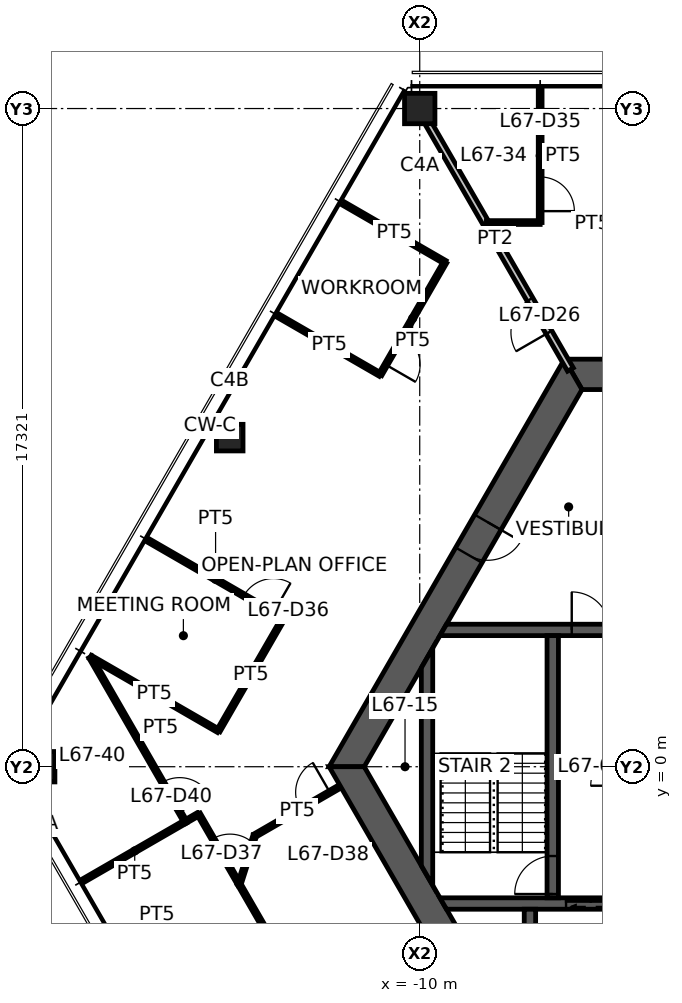
"""IFC4 building model, lengths in metres.
Left out: names, types, materials, properties, quantities, classifications, styles, units other than length and angle.
Written with IfcOpenShell. Run it as: python <this file> out.ifc"""

import sys

from ifc_helpers import new_model, si_unit, direction, frame, frame_2d, origin, origin_2d, place, context, subcontext, project, spatial, polyline, rectangle, hollow_rectangle, outline, extrude, element, fill, save


model = new_model("IFC4")
c1 = context("Model", 3, precision=1e-05, world=origin(), true_north=direction((0.0, 1.0)))
c2 = subcontext(c1, "Body", "Model", "MODEL_VIEW")
j1 = project(units=[si_unit("LENGTHUNIT", "METRE"), si_unit("PLANEANGLEUNIT", "RADIAN")], contexts=[c1])
p1 = place(None, origin())
s1 = spatial("IfcSite", under=j1, at=p1, CompositionType="ELEMENT")
p2 = place(p1, origin())
s2 = spatial("IfcBuilding", under=s1, at=p2, CompositionType="ELEMENT")
p3 = place(p2, frame((0.0, 0.0, 267.4)))
s3 = spatial("IfcBuildingStorey", under=s2, at=p3, CompositionType="ELEMENT", Elevation=267.4)
for number, where, z_axis, x_axis in (
    (1, (-10.0, 17.321, 0.0), (0.0, 0.0, 1.0), (1.0, 0.0, 0.0)),
    (2, (-20.0, 0.0, 0.0), (0.0, 0.0, 1.0), (1.0, 0.0, 0.0)),
):
    element("IfcColumn", number, at=place(p3, frame(where, z_axis=z_axis, x_axis=x_axis)), inside=s3, PredefinedType="COLUMN", context=c2, shape_type="SweptSolid", body=[
        extrude(hollow_rectangle(XDim=0.8, YDim=0.8, WallThickness=0.04, at=origin_2d()), origin(), (0.0, 0.0, 1.0), 3.9),
    ])
p4 = place(p3, frame((-15.0, 8.66, 0.0), z_axis=(0.0, 0.0, 1.0), x_axis=(1.0, 0.0, 0.0)))
e3 = element("IfcColumn", 3, at=p4, inside=s3, PredefinedType="COLUMN", context=c2, shape_type="SweptSolid", body=[
    extrude(hollow_rectangle(XDim=0.7, YDim=0.7, WallThickness=0.032, at=origin_2d()), origin(), (0.0, 0.0, 1.0), 3.9),
])
p5 = place(p3, frame((5.961, 10.325, 0.0), z_axis=(0.0, 0.0, 1.0), x_axis=(-1.0, 0.0, 0.0)))
e4 = element("IfcWall", 4, at=p5, inside=s3, PredefinedType="SHEAR", context=c2, shape_type="SweptSolid", body=[
    extrude(outline(polyline([(-0.231, -0.4), (4.636, -0.4), (5.536, -0.4), (6.386, -0.4), (7.286, -0.4), (12.153, -0.4), (11.691, 0.4), (7.286, 0.4), (6.386, 0.4), (5.536, 0.4), (4.636, 0.4), (0.231, 0.4), (-0.231, -0.4)])), origin(), (0.0, 0.0, 1.0), 3.9),
])
p6 = place(p5, frame((6.386, 0.0, 0.0)))
e5 = element("IfcOpeningElement", 5, at=p6, cuts=e4, PredefinedType="OPENING", context=c2, shape_type="SweptSolid", body=[
    extrude(rectangle(XDim=0.9, YDim=2.1, at=frame_2d((0.45, 1.05))), frame((0.0, 0.41, 0.0), z_axis=(0.0, -1.0, 0.0), x_axis=(1.0, 0.0, 0.0)), (0.0, 0.0, 1.0), 0.82),
])
p7 = place(p5, frame((4.636, 0.0, 0.0)))
e6 = element("IfcOpeningElement", 6, at=p7, cuts=e4, PredefinedType="OPENING", context=c2, shape_type="SweptSolid", body=[
    extrude(rectangle(XDim=0.9, YDim=2.1, at=frame_2d((0.45, 1.05))), frame((0.0, 0.41, 0.0), z_axis=(0.0, -1.0, 0.0), x_axis=(1.0, 0.0, 0.0)), (0.0, 0.0, 1.0), 0.82),
])
p8 = place(p3, frame((-5.961, 10.325, 0.0), z_axis=(0.0, 0.0, 1.0), x_axis=(-0.500004296715, -0.866022923061, 0.0)))
e7 = element("IfcWall", 7, at=p8, inside=s3, PredefinedType="SHEAR", context=c2, shape_type="SweptSolid", body=[
    extrude(outline(polyline([(-0.231, -0.4), (4.494, -0.4), (5.494, -0.4), (12.153, -0.4), (11.691, 0.4), (5.494, 0.4), (4.494, 0.4), (0.231, 0.4), (-0.231, -0.4)])), origin(), (0.0, 0.0, 1.0), 3.9),
])
p9 = place(p8, frame((4.494, 0.0, 0.0)))
e8 = element("IfcOpeningElement", 8, at=p9, cuts=e7, PredefinedType="OPENING", context=c2, shape_type="SweptSolid", body=[
    extrude(rectangle(XDim=1.0, YDim=2.1, at=frame_2d((0.5, 1.05))), frame((0.0, 0.41, 0.0), z_axis=(0.0, -1.0, 0.0), x_axis=(1.0, 0.0, 0.0)), (0.0, 0.0, 1.0), 0.82),
])
p10 = place(p3, frame((-11.922, 0.0, 0.0), z_axis=(0.0, 0.0, 1.0), x_axis=(0.500004296715, -0.866022923061, 0.0)))
e9 = element("IfcWall", 9, at=p10, inside=s3, PredefinedType="SHEAR", context=c2, shape_type="SweptSolid", body=[
    extrude(outline(polyline([(-0.231, -0.4), (6.281, -0.4), (7.081, -0.4), (12.153, -0.4), (11.691, 0.4), (7.081, 0.4), (6.281, 0.4), (0.231, 0.4), (-0.231, -0.4)])), origin(), (0.0, 0.0, 1.0), 3.9),
])
p11 = place(p10, frame((6.281, 0.0, 0.0)))
e10 = element("IfcOpeningElement", 10, at=p11, cuts=e9, PredefinedType="OPENING", context=c2, shape_type="SweptSolid", body=[
    extrude(rectangle(XDim=0.8, YDim=2.1, at=frame_2d((0.4, 1.05))), frame((0.0, 0.41, 0.0), z_axis=(0.0, -1.0, 0.0), x_axis=(1.0, 0.0, 0.0)), (0.0, 0.0, 1.0), 0.82),
])
p12 = place(p3, frame((-9.382, 3.6, 0.0), z_axis=(0.0, 0.0, 1.0), x_axis=(1.0, 0.0, 0.0)))
e11 = element("IfcWall", 11, at=p12, inside=s3, PredefinedType="SHEAR", context=c2, shape_type="SweptSolid", body=[
    extrude(outline(polyline([(-0.087, -0.15), (3.382, -0.15), (4.382, -0.15), (5.782, -0.15), (6.882, -0.15), (7.932, -0.15), (7.932, 0.15), (6.882, 0.15), (5.782, 0.15), (4.382, 0.15), (3.382, 0.15), (0.087, 0.15), (-0.087, -0.15)])), origin(), (0.0, 0.0, 1.0), 3.9),
])
p13 = place(p12, frame((3.382, 0.0, 0.0)))
e12 = element("IfcOpeningElement", 12, at=p13, cuts=e11, PredefinedType="OPENING", context=c2, shape_type="SweptSolid", body=[
    extrude(rectangle(XDim=1.0, YDim=2.1, at=frame_2d((0.5, 1.05))), frame((0.0, 0.16, 0.0), z_axis=(0.0, -1.0, 0.0), x_axis=(1.0, 0.0, 0.0)), (0.0, 0.0, 1.0), 0.32),
])
p14 = place(p12, frame((5.782, 0.0, 0.0)))
e13 = element("IfcOpeningElement", 13, at=p14, cuts=e11, PredefinedType="OPENING", context=c2, shape_type="SweptSolid", body=[
    extrude(rectangle(XDim=1.1, YDim=2.1, at=frame_2d((0.55, 1.05))), frame((0.0, 0.16, 0.0), z_axis=(0.0, -1.0, 0.0), x_axis=(1.0, 0.0, 0.0)), (0.0, 0.0, 1.0), 0.32),
])
p15 = place(p3, frame((-9.382, -3.6, 0.0), z_axis=(0.0, 0.0, 1.0), x_axis=(1.0, 0.0, 0.0)))
e14 = element("IfcWall", 14, at=p15, inside=s3, PredefinedType="SHEAR", context=c2, shape_type="SweptSolid", body=[
    extrude(outline(polyline([(0.087, -0.15), (3.232, -0.15), (4.532, -0.15), (5.782, -0.15), (6.882, -0.15), (7.932, -0.15), (7.932, 0.15), (6.882, 0.15), (5.782, 0.15), (4.532, 0.15), (3.232, 0.15), (-0.087, 0.15), (0.087, -0.15)])), origin(), (0.0, 0.0, 1.0), 3.9),
])
p16 = place(p15, frame((5.782, 0.0, 0.0)))
e15 = element("IfcOpeningElement", 15, at=p16, cuts=e14, PredefinedType="OPENING", context=c2, shape_type="SweptSolid", body=[
    extrude(rectangle(XDim=1.1, YDim=2.1, at=frame_2d((0.55, 1.05))), frame((0.0, 0.16, 0.0), z_axis=(0.0, -1.0, 0.0), x_axis=(1.0, 0.0, 0.0)), (0.0, 0.0, 1.0), 0.32),
])
p17 = place(p15, frame((3.232, 0.0, 0.0)))
e16 = element("IfcOpeningElement", 16, at=p17, cuts=e14, PredefinedType="OPENING", context=c2, shape_type="SweptSolid", body=[
    extrude(rectangle(XDim=1.3, YDim=2.1, at=frame_2d((0.65, 1.05))), frame((0.0, 0.16, 0.0), z_axis=(0.0, -1.0, 0.0), x_axis=(1.0, 0.0, 0.0)), (0.0, 0.0, 1.0), 0.32),
])
p18 = place(p3, frame((-6.5, -3.45, 0.0), z_axis=(0.0, 0.0, 1.0), x_axis=(0.0, 1.0, 0.0)))
e17 = element("IfcWall", 17, at=p18, inside=s3, PredefinedType="SHEAR", context=c2, shape_type="SweptSolid", body=[
    extrude(rectangle(XDim=6.9, YDim=0.3, at=frame_2d((3.45, 0.0))), origin(), (0.0, 0.0, 1.0), 3.9),
])
p19 = place(p18, frame((0.1, 0.0, 0.0)))
e18 = element("IfcOpeningElement", 18, at=p19, cuts=e17, PredefinedType="OPENING", context=c2, shape_type="SweptSolid", body=[
    extrude(rectangle(XDim=1.0, YDim=2.1, at=frame_2d((0.5, 1.05))), frame((0.0, 0.16, 0.0), z_axis=(0.0, -1.0, 0.0), x_axis=(1.0, 0.0, 0.0)), (0.0, 0.0, 1.0), 0.32),
])
p20 = place(p3, frame((-7.1, -3.75, 0.0), z_axis=(0.0, 0.0, 1.0), x_axis=(0.0, -1.0, 0.0)))
e19 = element("IfcWall", 19, at=p20, inside=s3, PredefinedType="SHEAR", context=c2, shape_type="SweptSolid", body=[
    extrude(rectangle(XDim=3.1, YDim=0.3, at=frame_2d((1.55, 0.0))), origin(), (0.0, 0.0, 1.0), 3.9),
])
p21 = place(p3, frame((-9.808, -2.862, 0.0), z_axis=(0.0, 0.0, 1.0), x_axis=(0.0, 1.0, 0.0)))
e20 = element("IfcWall", 20, at=p21, inside=s3, PredefinedType="SHEAR", context=c2, shape_type="SweptSolid", body=[
    extrude(outline(polyline([(-0.26, -0.15), (5.984, -0.15), (5.465, 0.15), (0.26, 0.15), (-0.26, -0.15)])), origin(), (0.0, 0.0, 1.0), 3.9),
])
p22 = place(p3, frame((-6.035, 10.453, 0.0), z_axis=(0.0, 0.0, 1.0), x_axis=(-0.499989830942, 0.866031274813, 0.0)))
e21 = element("IfcWall", 21, at=p22, inside=s3, PredefinedType="PARTITIONING", context=c2, shape_type="SweptSolid", body=[
    extrude(rectangle(XDim=7.93, YDim=0.175, at=frame_2d((3.965, 0.0))), origin(), (0.0, 0.0, 1.0), 3.05),
])
p23 = place(p22, frame((1.13, 0.0, 0.0)))
e22 = element("IfcOpeningElement", 22, at=p23, cuts=e21, PredefinedType="OPENING", context=c2, shape_type="SweptSolid", body=[
    extrude(rectangle(XDim=1.0, YDim=2.1, at=frame_2d((0.5, 1.05))), frame((0.0, 0.098, 0.0), z_axis=(0.0, -1.0, 0.0), x_axis=(1.0, 0.0, 0.0)), (0.0, 0.0, 1.0), 0.195),
])
p24 = place(p3, frame((-6.831, 14.321, 0.0), z_axis=(0.0, 0.0, 1.0), x_axis=(-1.0, 0.0, 0.0)))
e23 = element("IfcWall", 23, at=p24, inside=s3, PredefinedType="PARTITIONING", context=c2, shape_type="SweptSolid", body=[
    extrude(rectangle(XDim=1.414, YDim=0.1, at=frame_2d((0.707, 0.0))), origin(), (0.0, 0.0, 1.0), 2.95),
])
p25 = place(p3, frame((-6.831, 17.835, 0.0), z_axis=(0.0, 0.0, 1.0), x_axis=(0.0, -1.0, 0.0)))
e24 = element("IfcWall", 24, at=p25, inside=s3, PredefinedType="PARTITIONING", context=c2, shape_type="SweptSolid", body=[
    extrude(rectangle(XDim=3.515, YDim=0.1, at=frame_2d((1.757, 0.0))), origin(), (0.0, 0.0, 1.0), 2.95),
])
p26 = place(p25, frame((2.315, 0.0, 0.0)))
e25 = element("IfcOpeningElement", 25, at=p26, cuts=e24, PredefinedType="OPENING", context=c2, shape_type="SweptSolid", body=[
    extrude(rectangle(XDim=0.9, YDim=2.1, at=frame_2d((0.45, 1.05))), frame((0.0, 0.06, 0.0), z_axis=(0.0, -1.0, 0.0), x_axis=(1.0, 0.0, 0.0)), (0.0, 0.0, 1.0), 0.12),
])
p27 = place(p3, frame((-17.154, 5.96, 0.0), z_axis=(0.0, 0.0, 1.0), x_axis=(0.866014662111, -0.500018604663, 0.0)))
e26 = element("IfcWall", 26, at=p27, inside=s3, PredefinedType="PARTITIONING", context=c2, shape_type="SweptSolid", body=[
    extrude(rectangle(XDim=4.115, YDim=0.1, at=frame_2d((2.058, 0.0))), origin(), (0.0, 0.0, 1.0), 2.95),
])
p28 = place(p27, frame((2.915, 0.0, 0.0)))
e27 = element("IfcOpeningElement", 27, at=p28, cuts=e26, PredefinedType="OPENING", context=c2, shape_type="SweptSolid", body=[
    extrude(rectangle(XDim=0.9, YDim=2.1, at=frame_2d((0.45, 1.05))), frame((0.0, 0.06, 0.0), z_axis=(0.0, -1.0, 0.0), x_axis=(1.0, 0.0, 0.0)), (0.0, 0.0, 1.0), 0.12),
])
p29 = place(p3, frame((-15.298, 0.945, 0.0), z_axis=(0.0, 0.0, 1.0), x_axis=(-0.866041390868, 0.499972308537, 0.0)))
e28 = element("IfcWall", 28, at=p29, inside=s3, PredefinedType="PARTITIONING", context=c2, shape_type="SweptSolid", body=[
    extrude(rectangle(XDim=3.891, YDim=0.1, at=frame_2d((1.945, 0.0))), origin(), (0.0, 0.0, 1.0), 2.95),
])
p30 = place(p3, frame((-13.59, 3.902, 0.0), z_axis=(0.0, 0.0, 1.0), x_axis=(-0.500021524473, -0.866012976267, 0.0)))
e29 = element("IfcWall", 29, at=p30, inside=s3, PredefinedType="PARTITIONING", context=c2, shape_type="SweptSolid", body=[
    extrude(rectangle(XDim=3.415, YDim=0.1, at=frame_2d((1.708, 0.0))), origin(), (0.0, 0.0, 1.0), 2.95),
])
p31 = place(p3, frame((-14.755, -3.085, 0.0), z_axis=(0.0, 0.0, 1.0), x_axis=(0.500006757851, -0.866021502102, 0.0)))
e30 = element("IfcWall", 30, at=p31, inside=s3, PredefinedType="PARTITIONING", context=c2, shape_type="SweptSolid", body=[
    extrude(rectangle(XDim=4.386, YDim=0.1, at=frame_2d((2.193, 0.0))), origin(), (0.0, 0.0, 1.0), 2.95),
])
p32 = place(p3, frame((-18.84, -2.99, 0.0), z_axis=(0.0, 0.0, 1.0), x_axis=(0.86601613395, 0.50001605548, 0.0)))
e31 = element("IfcWall", 31, at=p32, inside=s3, PredefinedType="PARTITIONING", context=c2, shape_type="SweptSolid", body=[
    extrude(rectangle(XDim=3.095, YDim=0.1, at=frame_2d((1.548, 0.0))), origin(), (0.0, 0.0, 1.0), 2.95),
])
p33 = place(p3, frame((-16.168, -1.447, 0.0), z_axis=(0.0, 0.0, 1.0), x_axis=(0.865894114129, 0.500227331437, 0.0)))
e32 = element("IfcWall", 32, at=p33, inside=s3, PredefinedType="PARTITIONING", context=c2, shape_type="SweptSolid", body=[
    extrude(rectangle(XDim=0.405, YDim=0.1, at=frame_2d((0.202, 0.0))), origin(), (0.0, 0.0, 1.0), 2.95),
])
p34 = place(p3, frame((-15.817, -1.244, 0.0), z_axis=(0.0, 0.0, 1.0), x_axis=(0.499986256893, -0.866033338225, 0.0)))
e33 = element("IfcWall", 33, at=p34, inside=s3, PredefinedType="PARTITIONING", context=c2, shape_type="SweptSolid", body=[
    extrude(rectangle(XDim=2.136, YDim=0.1, at=frame_2d((1.068, 0.0))), origin(), (0.0, 0.0, 1.0), 2.95),
])
p35 = place(p34, frame((0.75, 0.0, 0.0)))
e34 = element("IfcOpeningElement", 34, at=p35, cuts=e33, PredefinedType="OPENING", context=c2, shape_type="SweptSolid", body=[
    extrude(rectangle(XDim=0.9, YDim=2.1, at=frame_2d((0.45, 1.05))), frame((0.0, 0.06, 0.0), z_axis=(0.0, -1.0, 0.0), x_axis=(1.0, 0.0, 0.0)), (0.0, 0.0, 1.0), 0.12),
])
p36 = place(p3, frame((-14.749, -3.094, 0.0), z_axis=(0.0, 0.0, 1.0), x_axis=(0.30351815006, 0.952825656972, 0.0)))
e35 = element("IfcWall", 35, at=p36, inside=s3, PredefinedType="PARTITIONING", context=c2, shape_type="SweptSolid", body=[
    extrude(rectangle(XDim=1.346, YDim=0.1, at=frame_2d((0.673, 0.0))), origin(), (0.0, 0.0, 1.0), 2.95),
])
p37 = place(p3, frame((-14.341, -1.812, 0.0), z_axis=(0.0, 0.0, 1.0), x_axis=(0.86617456, 0.499741564819, 0.0)))
e36 = element("IfcWall", 36, at=p37, inside=s3, PredefinedType="PARTITIONING", context=c2, shape_type="SweptSolid", body=[
    extrude(rectangle(XDim=2.58, YDim=0.1, at=frame_2d((1.29, 0.0))), origin(), (0.0, 0.0, 1.0), 2.95),
])
p38 = place(p37, frame((1.381, 0.0, 0.0)))
e37 = element("IfcOpeningElement", 37, at=p38, cuts=e36, PredefinedType="OPENING", context=c2, shape_type="SweptSolid", body=[
    extrude(rectangle(XDim=0.9, YDim=2.1, at=frame_2d((0.45, 1.05))), frame((0.0, 0.06, 0.0), z_axis=(0.0, -1.0, 0.0), x_axis=(1.0, 0.0, 0.0)), (0.0, 0.0, 1.0), 0.12),
])
p39 = place(p3, frame((-12.0, 14.816, 0.0), z_axis=(0.0, 0.0, 1.0), x_axis=(0.866010015463, -0.500026652407, 0.0)))
e38 = element("IfcWall", 38, at=p39, inside=s3, PredefinedType="PARTITIONING", context=c2, shape_type="SweptSolid", body=[
    extrude(rectangle(XDim=3.08, YDim=0.1, at=frame_2d((1.54, 0.0))), origin(), (0.0, 0.0, 1.0), 2.95),
])
p40 = place(p3, frame((-11.041, 10.318, 0.0), z_axis=(0.0, 0.0, 1.0), x_axis=(-0.866056658381, 0.499945861543, 0.0)))
e39 = element("IfcWall", 39, at=p40, inside=s3, PredefinedType="PARTITIONING", context=c2, shape_type="SweptSolid", body=[
    extrude(rectangle(XDim=3.09, YDim=0.1, at=frame_2d((1.545, 0.0))), origin(), (0.0, 0.0, 1.0), 2.95),
])
p41 = place(p3, frame((-9.333, 13.276, 0.0), z_axis=(0.0, 0.0, 1.0), x_axis=(-0.499967911108, -0.866043929522, 0.0)))
e40 = element("IfcWall", 40, at=p41, inside=s3, PredefinedType="PARTITIONING", context=c2, shape_type="SweptSolid", body=[
    extrude(rectangle(XDim=3.415, YDim=0.1, at=frame_2d((1.708, 0.0))), origin(), (0.0, 0.0, 1.0), 2.95),
])
p42 = place(p41, frame((2.216, 0.0, 0.0)))
e41 = element("IfcOpeningElement", 41, at=p42, cuts=e40, PredefinedType="OPENING", context=c2, shape_type="SweptSolid", body=[
    extrude(rectangle(XDim=0.9, YDim=2.1, at=frame_2d((0.45, 1.05))), frame((0.0, 0.06, 0.0), z_axis=(0.0, -1.0, 0.0), x_axis=(1.0, 0.0, 0.0)), (0.0, 0.0, 1.0), 0.12),
])
p43 = place(p3, frame((-18.667, 2.89, 0.0), z_axis=(0.0, 0.0, 1.0), x_axis=(0.499397294175, -0.866373096634, 0.0)))
e42 = element("IfcWall", 42, at=p43, inside=s3, PredefinedType="PARTITIONING", context=c2, shape_type="SweptSolid", body=[
    extrude(rectangle(XDim=5.006, YDim=0.1, at=frame_2d((2.503, 0.0))), origin(), (0.0, 0.0, 1.0), 2.95),
])
p44 = place(p43, frame((3.806, 0.0, 0.0)))
e43 = element("IfcOpeningElement", 43, at=p44, cuts=e42, PredefinedType="OPENING", context=c2, shape_type="SweptSolid", body=[
    extrude(rectangle(XDim=0.9, YDim=2.1, at=frame_2d((0.45, 1.05))), frame((0.0, 0.06, 0.0), z_axis=(0.0, -1.0, 0.0), x_axis=(1.0, 0.0, 0.0)), (0.0, 0.0, 1.0), 0.12),
])
p45 = place(p9, origin())
e44 = element("IfcDoor", 44, at=p45, inside=s3, OperationType="SINGLE_SWING_LEFT", PredefinedType="DOOR", context=c2, shape_type="SweptSolid", body=[
    extrude(rectangle(XDim=1.0, YDim=2.1, at=frame_2d((0.5, 1.05))), frame((0.0, 0.025, 0.0), z_axis=(0.0, -1.0, 0.0), x_axis=(1.0, 0.0, 0.0)), (0.0, 0.0, 1.0), 0.05),
])
fill(e8, e44)
p46 = place(p19, origin())
e45 = element("IfcDoor", 45, at=p46, inside=s3, OperationType="SINGLE_SWING_LEFT", PredefinedType="DOOR", context=c2, shape_type="SweptSolid", body=[
    extrude(rectangle(XDim=1.0, YDim=2.1, at=frame_2d((0.5, 1.05))), frame((0.0, 0.025, 0.0), z_axis=(0.0, -1.0, 0.0), x_axis=(1.0, 0.0, 0.0)), (0.0, 0.0, 1.0), 0.05),
])
fill(e18, e45)
p47 = place(p13, origin())
e46 = element("IfcDoor", 46, at=p47, inside=s3, OperationType="SINGLE_SWING_LEFT", PredefinedType="DOOR", context=c2, shape_type="SweptSolid", body=[
    extrude(rectangle(XDim=1.0, YDim=2.1, at=frame_2d((0.5, 1.05))), frame((0.0, 0.025, 0.0), z_axis=(0.0, -1.0, 0.0), x_axis=(1.0, 0.0, 0.0)), (0.0, 0.0, 1.0), 0.05),
])
fill(e12, e46)
p48 = place(p23, origin())
e47 = element("IfcDoor", 47, at=p48, inside=s3, OperationType="SINGLE_SWING_LEFT", PredefinedType="DOOR", context=c2, shape_type="SweptSolid", body=[
    extrude(rectangle(XDim=1.0, YDim=2.1, at=frame_2d((0.5, 1.05))), frame((0.0, 0.025, 0.0), z_axis=(0.0, -1.0, 0.0), x_axis=(1.0, 0.0, 0.0)), (0.0, 0.0, 1.0), 0.05),
])
fill(e22, e47)
p49 = place(p26, origin())
e48 = element("IfcDoor", 48, at=p49, inside=s3, OperationType="SINGLE_SWING_RIGHT", PredefinedType="DOOR", context=c2, shape_type="SweptSolid", body=[
    extrude(rectangle(XDim=0.9, YDim=2.1, at=frame_2d((0.45, 1.05))), frame((0.0, 0.025, 0.0), z_axis=(0.0, -1.0, 0.0), x_axis=(1.0, 0.0, 0.0)), (0.0, 0.0, 1.0), 0.05),
])
fill(e25, e48)
p50 = place(p28, origin())
e49 = element("IfcDoor", 49, at=p50, inside=s3, OperationType="SINGLE_SWING_RIGHT", PredefinedType="DOOR", context=c2, shape_type="SweptSolid", body=[
    extrude(rectangle(XDim=0.9, YDim=2.1, at=frame_2d((0.45, 1.05))), frame((0.0, 0.025, 0.0), z_axis=(0.0, -1.0, 0.0), x_axis=(1.0, 0.0, 0.0)), (0.0, 0.0, 1.0), 0.05),
])
fill(e27, e49)
p51 = place(p35, origin())
e50 = element("IfcDoor", 50, at=p51, inside=s3, OperationType="SINGLE_SWING_RIGHT", PredefinedType="DOOR", context=c2, shape_type="SweptSolid", body=[
    extrude(rectangle(XDim=0.9, YDim=2.1, at=frame_2d((0.45, 1.05))), frame((0.0, 0.025, 0.0), z_axis=(0.0, -1.0, 0.0), x_axis=(1.0, 0.0, 0.0)), (0.0, 0.0, 1.0), 0.05),
])
fill(e34, e50)
p52 = place(p38, origin())
e51 = element("IfcDoor", 51, at=p52, inside=s3, OperationType="SINGLE_SWING_RIGHT", PredefinedType="DOOR", context=c2, shape_type="SweptSolid", body=[
    extrude(rectangle(XDim=0.9, YDim=2.1, at=frame_2d((0.45, 1.05))), frame((0.0, 0.025, 0.0), z_axis=(0.0, -1.0, 0.0), x_axis=(1.0, 0.0, 0.0)), (0.0, 0.0, 1.0), 0.05),
])
fill(e37, e51)
p53 = place(p42, origin())
e52 = element("IfcDoor", 52, at=p53, inside=s3, OperationType="SINGLE_SWING_RIGHT", PredefinedType="DOOR", context=c2, shape_type="SweptSolid", body=[
    extrude(rectangle(XDim=0.9, YDim=2.1, at=frame_2d((0.45, 1.05))), frame((0.0, 0.025, 0.0), z_axis=(0.0, -1.0, 0.0), x_axis=(1.0, 0.0, 0.0)), (0.0, 0.0, 1.0), 0.05),
])
fill(e41, e52)
p54 = place(p44, origin())
e53 = element("IfcDoor", 53, at=p54, inside=s3, OperationType="SINGLE_SWING_RIGHT", PredefinedType="DOOR", context=c2, shape_type="SweptSolid", body=[
    extrude(rectangle(XDim=0.9, YDim=2.1, at=frame_2d((0.45, 1.05))), frame((0.0, 0.025, 0.0), z_axis=(0.0, -1.0, 0.0), x_axis=(1.0, 0.0, 0.0)), (0.0, 0.0, 1.0), 0.05),
])
fill(e43, e53)
p55 = place(p17, origin())
e54 = element("IfcDoor", 54, at=p55, inside=s3, OperationType="DOUBLE_DOOR_SLIDING", PredefinedType="DOOR", context=c2, shape_type="SweptSolid", body=[
    extrude(rectangle(XDim=1.3, YDim=2.1, at=frame_2d((0.65, 1.05))), frame((0.0, 0.025, 0.0), z_axis=(0.0, -1.0, 0.0), x_axis=(1.0, 0.0, 0.0)), (0.0, 0.0, 1.0), 0.05),
])
fill(e16, e54)
save(model, sys.argv[1])
